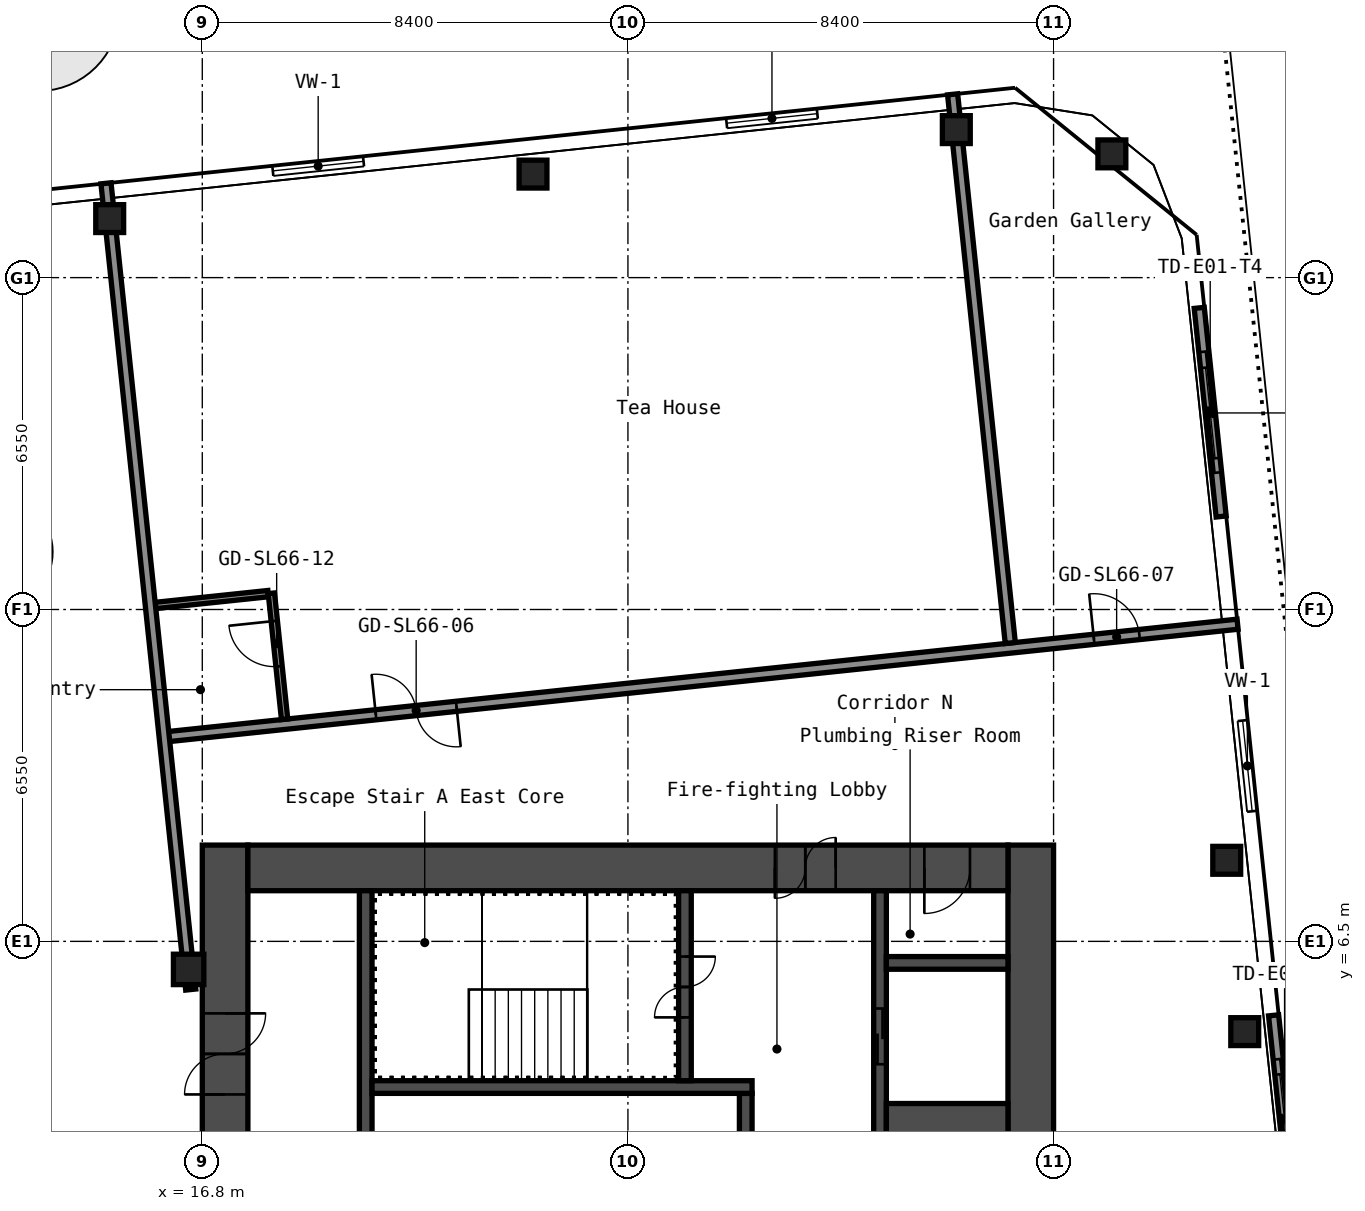
"""IFC4 building model, lengths in metres.
Left out: names, types, materials, properties, quantities, classifications, styles, units other than length and angle.
Written with IfcOpenShell. Run it as: python <this file> out.ifc"""

import sys

from ifc_helpers import new_model, si_unit, direction, frame, frame_2d, origin, origin_2d, place, context, subcontext, project, spatial, rectangle, hollow_rectangle, extrude, element, fill, save


model = new_model("IFC4")
c1 = context("Model", 3, precision=1e-05, world=origin(), true_north=direction((0.0, 1.0)))
c2 = subcontext(c1, "Body", "Model", "MODEL_VIEW")
j1 = project(units=[si_unit("LENGTHUNIT", "METRE"), si_unit("PLANEANGLEUNIT", "RADIAN")], contexts=[c1])
p1 = place(None, origin())
s1 = spatial("IfcSite", under=j1, at=p1, CompositionType="ELEMENT")
p2 = place(p1, origin())
s2 = spatial("IfcBuilding", under=s1, at=p2, CompositionType="ELEMENT")
p3 = place(p2, frame((0.0, 0.0, 232.6)))
s3 = spatial("IfcBuildingStorey", under=s2, at=p3, CompositionType="ELEMENT", Elevation=232.6)
p4 = place(p3, frame((16.53, 5.947, 0.0), z_axis=(0.0, 0.0, 1.0), x_axis=(1.0, 0.0, 0.0)))
e1 = element("IfcColumn", 1, at=p4, inside=s3, PredefinedType="COLUMN", context=c2, shape_type="SweptSolid", body=[
    extrude(hollow_rectangle(XDim=0.6, YDim=0.6, WallThickness=0.025, InnerFilletRadius=0.038, OuterFilletRadius=0.062, at=origin_2d()), origin(), (0.0, 0.0, 1.0), 5.95),
])
for number, where, z_axis, x_axis in (
    (2, (14.973, 20.765, 0.0), (0.0, 0.0, 1.0), (1.0, 0.0, 0.0)),
    (3, (23.327, 21.643, 0.0), (0.0, 0.0, 1.0), (1.0, 0.0, 0.0)),
    (4, (31.681, 22.521, 0.0), (0.0, 0.0, 1.0), (1.0, 0.0, 0.0)),
    (5, (37.373, 4.719, 0.0), (0.0, 0.0, 1.0), (1.0, 0.0, 0.0)),
    (6, (37.017, 8.1, 0.0), (0.0, 0.0, 1.0), (1.0, 0.0, 0.0)),
    (7, (34.751, 22.042, 0.0), (0.0, 0.0, 1.0), (1.0, 0.0, 0.0)),
):
    element("IfcColumn", number, at=place(p3, frame(where, z_axis=z_axis, x_axis=x_axis)), inside=s3, PredefinedType="COLUMN", context=c2, shape_type="SweptSolid", body=[
        extrude(hollow_rectangle(XDim=0.55, YDim=0.55, WallThickness=0.022, InnerFilletRadius=0.033, OuterFilletRadius=0.055, at=origin_2d()), origin(), (0.0, 0.0, 1.0), 5.95),
    ])
p5 = place(p3, frame((17.25, -8.4, 0.0), z_axis=(0.0, 0.0, 1.0), x_axis=(0.0, 1.0, 0.0)))
e8 = element("IfcWall", 8, at=p5, inside=s3, PredefinedType="SHEAR", context=c2, shape_type="SweptSolid", body=[
    extrude(rectangle(XDim=16.8, YDim=0.9, at=frame_2d((8.4, 0.0))), origin(), (0.0, 0.0, 1.0), 5.95),
])
p6 = place(p5, frame((11.879, 0.0, 0.0)))
e9 = element("IfcOpeningElement", 9, at=p6, cuts=e8, PredefinedType="OPENING", context=c2, shape_type="SweptSolid", body=[
    extrude(rectangle(XDim=1.6, YDim=2.1, at=frame_2d((0.8, 1.05))), frame((0.0, 0.46, 0.0), z_axis=(0.0, -1.0, 0.0), x_axis=(1.0, 0.0, 0.0)), (0.0, 0.0, 1.0), 0.92),
])
p7 = place(p3, frame((33.15, -8.4, 0.0), z_axis=(0.0, 0.0, 1.0), x_axis=(0.0, 1.0, 0.0)))
e10 = element("IfcWall", 10, at=p7, inside=s3, PredefinedType="SHEAR", context=c2, shape_type="SweptSolid", body=[
    extrude(rectangle(XDim=16.8, YDim=0.9, at=frame_2d((8.4, 0.0))), origin(), (0.0, 0.0, 1.0), 5.95),
])
p8 = place(p3, frame((17.7, 7.95, 0.0), z_axis=(0.0, 0.0, 1.0), x_axis=(1.0, 0.0, 0.0)))
e11 = element("IfcWall", 11, at=p8, inside=s3, PredefinedType="SHEAR", context=c2, shape_type="SweptSolid", body=[
    extrude(rectangle(XDim=15.0, YDim=0.9, at=frame_2d((7.5, 0.0))), origin(), (0.0, 0.0, 1.0), 5.95),
])
p9 = place(p8, frame((10.4, 0.0, 0.0)))
e12 = element("IfcOpeningElement", 12, at=p9, cuts=e11, PredefinedType="OPENING", context=c2, shape_type="SweptSolid", body=[
    extrude(rectangle(XDim=1.2, YDim=2.1, at=frame_2d((0.6, 1.05))), frame((0.0, 0.46, 0.0), z_axis=(0.0, -1.0, 0.0), x_axis=(1.0, 0.0, 0.0)), (0.0, 0.0, 1.0), 0.92),
])
p10 = place(p8, frame((13.35, 0.0, 0.0)))
e13 = element("IfcOpeningElement", 13, at=p10, cuts=e11, PredefinedType="OPENING", context=c2, shape_type="SweptSolid", body=[
    extrude(rectangle(XDim=0.9, YDim=2.1, at=frame_2d((0.45, 1.05))), frame((0.0, 0.46, 0.0), z_axis=(0.0, -1.0, 0.0), x_axis=(1.0, 0.0, 0.0)), (0.0, 0.0, 1.0), 0.92),
])
p11 = place(p3, frame((20.025, 1.2, 0.0), z_axis=(0.0, 0.0, 1.0), x_axis=(0.0, 1.0, 0.0)))
e14 = element("IfcWall", 14, at=p11, inside=s3, PredefinedType="SHEAR", context=c2, shape_type="SweptSolid", body=[
    extrude(rectangle(XDim=6.3, YDim=0.25, at=frame_2d((3.15, 0.0))), origin(), (0.0, 0.0, 1.0), 5.95),
])
p12 = place(p3, frame((27.525, 1.45, 0.0), z_axis=(0.0, 0.0, 1.0), x_axis=(0.0, 1.0, 0.0)))
e15 = element("IfcWall", 15, at=p12, inside=s3, PredefinedType="SHEAR", context=c2, shape_type="SweptSolid", body=[
    extrude(rectangle(XDim=2.05, YDim=0.25, at=frame_2d((1.025, 0.0))), origin(), (0.0, 0.0, 1.0), 5.95),
])
p13 = place(p3, frame((20.15, 3.625, 0.0), z_axis=(0.0, 0.0, 1.0), x_axis=(1.0, 0.0, 0.0)))
e16 = element("IfcWall", 16, at=p13, inside=s3, PredefinedType="SHEAR", context=c2, shape_type="SweptSolid", body=[
    extrude(rectangle(XDim=7.5, YDim=0.25, at=frame_2d((3.75, 0.0))), origin(), (0.0, 0.0, 1.0), 5.95),
])
p14 = place(p3, frame((26.325, 3.75, 0.0), z_axis=(0.0, 0.0, 1.0), x_axis=(0.0, 1.0, 0.0)))
e17 = element("IfcWall", 17, at=p14, inside=s3, PredefinedType="SHEAR", context=c2, shape_type="SweptSolid", body=[
    extrude(rectangle(XDim=3.75, YDim=0.25, at=frame_2d((1.875, 0.0))), origin(), (0.0, 0.0, 1.0), 5.95),
])
p15 = place(p14, frame((1.25, 0.0, 0.0)))
e18 = element("IfcOpeningElement", 18, at=p15, cuts=e17, PredefinedType="OPENING", context=c2, shape_type="SweptSolid", body=[
    extrude(rectangle(XDim=1.2, YDim=2.1, at=frame_2d((0.6, 1.05))), frame((0.0, 0.135, 0.0), z_axis=(0.0, -1.0, 0.0), x_axis=(1.0, 0.0, 0.0)), (0.0, 0.0, 1.0), 0.27),
])
p16 = place(p3, frame((30.175, 1.45, 0.0), z_axis=(0.0, 0.0, 1.0), x_axis=(0.0, 1.0, 0.0)))
e19 = element("IfcWall", 19, at=p16, inside=s3, PredefinedType="SHEAR", context=c2, shape_type="SweptSolid", body=[
    extrude(rectangle(XDim=6.05, YDim=0.25, at=frame_2d((3.025, 0.0))), origin(), (0.0, 0.0, 1.0), 5.95),
])
p17 = place(p16, frame((2.625, 0.0, 0.0)))
e20 = element("IfcOpeningElement", 20, at=p17, cuts=e19, PredefinedType="OPENING", context=c2, shape_type="SweptSolid", body=[
    extrude(rectangle(XDim=1.1, YDim=2.1, at=frame_2d((0.55, 1.05))), frame((0.0, 0.135, 0.0), z_axis=(0.0, -1.0, 0.0), x_axis=(1.0, 0.0, 0.0)), (0.0, 0.0, 1.0), 0.27),
])
p18 = place(p3, frame((30.3, 2.375, 0.0), z_axis=(0.0, 0.0, 1.0), x_axis=(1.0, 0.0, 0.0)))
e21 = element("IfcWall", 21, at=p18, inside=s3, PredefinedType="SHEAR", context=c2, shape_type="SweptSolid", body=[
    extrude(rectangle(XDim=2.4, YDim=1.85, at=frame_2d((1.2, 0.0))), origin(), (0.0, 0.0, 1.0), 5.95),
])
p19 = place(p3, frame((30.3, 6.075, 0.0), z_axis=(0.0, 0.0, 1.0), x_axis=(1.0, 0.0, 0.0)))
e22 = element("IfcWall", 22, at=p19, inside=s3, PredefinedType="SHEAR", context=c2, shape_type="SweptSolid", body=[
    extrude(rectangle(XDim=2.4, YDim=0.25, at=frame_2d((1.2, 0.0))), origin(), (0.0, 0.0, 1.0), 5.95),
])
p20 = place(p3, frame((16.048, 10.533, 0.0), z_axis=(0.0, 0.0, 1.0), x_axis=(0.994522460242, 0.104523088709, 0.0)))
e23 = element("IfcWall", 23, at=p20, inside=s3, PredefinedType="PARTITIONING", context=c2, shape_type="SweptSolid", body=[
    extrude(rectangle(XDim=21.3, YDim=0.2, at=frame_2d((10.65, 0.0))), origin(), (0.0, 0.0, 1.0), 5.95),
])
p21 = place(p20, frame((4.2, 0.0, 0.0)))
e24 = element("IfcOpeningElement", 24, at=p21, cuts=e23, PredefinedType="OPENING", context=c2, shape_type="SweptSolid", body=[
    extrude(rectangle(XDim=1.6, YDim=2.1, at=frame_2d((0.8, 1.05))), frame((0.0, 0.11, 0.0), z_axis=(0.0, -1.0, 0.0), x_axis=(1.0, 0.0, 0.0)), (0.0, 0.0, 1.0), 0.22),
])
p22 = place(p20, frame((18.45, 0.0, 0.0)))
e25 = element("IfcOpeningElement", 25, at=p22, cuts=e23, PredefinedType="OPENING", context=c2, shape_type="SweptSolid", body=[
    extrude(rectangle(XDim=0.9, YDim=2.1, at=frame_2d((0.45, 1.05))), frame((0.0, 0.11, 0.0), z_axis=(0.0, -1.0, 0.0), x_axis=(1.0, 0.0, 0.0)), (0.0, 0.0, 1.0), 0.22),
])
p23 = place(p3, frame((15.876, 13.129, 0.0), z_axis=(0.0, 0.0, 1.0), x_axis=(0.994520987839, 0.104537097471, 0.0)))
e26 = element("IfcWall", 26, at=p23, inside=s3, PredefinedType="PARTITIONING", context=c2, shape_type="SweptSolid", body=[
    extrude(rectangle(XDim=2.237, YDim=0.125, at=frame_2d((1.119, 0.0))), origin(), (0.0, 0.0, 1.0), 5.95),
])
p24 = place(p3, frame((16.572, 5.549, 0.0), z_axis=(0.0, 0.0, 1.0), x_axis=(-0.104522747265, 0.994522496128, 0.0)))
e27 = element("IfcWall", 27, at=p24, inside=s3, PredefinedType="PARTITIONING", context=c2, shape_type="SweptSolid", body=[
    extrude(rectangle(XDim=16.0, YDim=0.2, at=frame_2d((8.0, 0.0))), origin(), (0.0, 0.0, 1.0), 5.95),
])
p25 = place(p3, frame((18.425, 10.884, 0.0), z_axis=(0.0, 0.0, 1.0), x_axis=(-0.104501760842, 0.994524701544, 0.0)))
e28 = element("IfcWall", 28, at=p25, inside=s3, PredefinedType="PARTITIONING", context=c2, shape_type="SweptSolid", body=[
    extrude(rectangle(XDim=2.5, YDim=0.125, at=frame_2d((1.25, 0.0))), origin(), (0.0, 0.0, 1.0), 5.95),
])
p26 = place(p25, frame((1.05, 0.0, 0.0)))
e29 = element("IfcOpeningElement", 29, at=p26, cuts=e28, PredefinedType="OPENING", context=c2, shape_type="SweptSolid", body=[
    extrude(rectangle(XDim=0.9, YDim=2.1, at=frame_2d((0.45, 1.05))), frame((0.0, 0.073, 0.0), z_axis=(0.0, -1.0, 0.0), x_axis=(1.0, 0.0, 0.0)), (0.0, 0.0, 1.0), 0.145),
])
p27 = place(p3, frame((32.746, 12.389, 0.0), z_axis=(0.0, 0.0, 1.0), x_axis=(-0.104533048416, 0.994521413439, 0.0)))
e30 = element("IfcWall", 30, at=p27, inside=s3, PredefinedType="PARTITIONING", context=c2, shape_type="SweptSolid", body=[
    extrude(rectangle(XDim=10.888, YDim=0.2, at=frame_2d((5.444, 0.0))), origin(), (0.0, 0.0, 1.0), 5.95),
])
p28 = place(p3, frame((38.526, -0.509, 4.45), z_axis=(0.0, 0.0, 1.0), x_axis=(-0.104543574031, 0.994520307047, 0.0)))
p29 = place(p28, frame((2.61, 0.0, 0.25)))
p30 = place(p29, origin())
e31 = element("IfcWindow", 31, at=p30, inside=s3, PartitioningType="SINGLE_PANEL", PredefinedType="WINDOW", context=c2, shape_type="SweptSolid", body=[
    extrude(rectangle(XDim=1.8, YDim=0.9, at=frame_2d((0.9, 0.45))), frame((0.0, 0.03, 0.0), z_axis=(0.0, -1.0, 0.0), x_axis=(1.0, 0.0, 0.0)), (0.0, 0.0, 1.0), 0.06),
])
p31 = place(p3, frame((37.792, 6.472, 4.45), z_axis=(0.0, 0.0, 1.0), x_axis=(-0.104512790532, 0.994523542514, 0.0)))
p32 = place(p31, frame((2.61, 0.0, 0.25)))
p33 = place(p32, origin())
e32 = element("IfcWindow", 32, at=p33, inside=s3, PartitioningType="SINGLE_PANEL", PredefinedType="WINDOW", context=c2, shape_type="SweptSolid", body=[
    extrude(rectangle(XDim=1.8, YDim=0.9, at=frame_2d((0.9, 0.45))), frame((0.0, 0.03, 0.0), z_axis=(0.0, -1.0, 0.0), x_axis=(1.0, 0.0, 0.0)), (0.0, 0.0, 1.0), 0.06),
])
p34 = place(p3, frame((37.058, 13.453, 4.45), z_axis=(0.0, 0.0, 1.0), x_axis=(-0.104541145751, 0.994520562304, 0.0)))
p35 = place(p34, frame((2.595, 0.0, 0.25)))
p36 = place(p35, origin())
e33 = element("IfcWindow", 33, at=p36, inside=s3, PartitioningType="SINGLE_PANEL", PredefinedType="WINDOW", context=c2, shape_type="SweptSolid", body=[
    extrude(rectangle(XDim=1.8, YDim=0.9, at=frame_2d((0.9, 0.45))), frame((0.0, 0.03, 0.0), z_axis=(0.0, -1.0, 0.0), x_axis=(1.0, 0.0, 0.0)), (0.0, 0.0, 1.0), 0.06),
])
p37 = place(p3, frame((38.375, 0.923, 0.0), z_axis=(0.0, 0.0, 1.0), x_axis=(-0.10450059231, 0.994524824329, 0.0)))
p38 = place(p37, frame((0.87, 0.0, 0.0)))
p39 = place(p38, frame((2.4, 0.0, 0.0), z_axis=(0.0, 0.0, 1.0), x_axis=(-1.0, 0.0, 0.0)))
e34 = element("IfcDoor", 34, at=p39, inside=s3, OperationType="SLIDING_TO_LEFT", PredefinedType="DOOR", context=c2, shape_type="SweptSolid", body=[
    extrude(rectangle(XDim=2.4, YDim=2.2, at=frame_2d((1.2, 1.1))), frame((0.0, 0.025, 0.0), z_axis=(0.0, -1.0, 0.0), x_axis=(1.0, 0.0, 0.0)), (0.0, 0.0, 1.0), 0.05),
])
p40 = place(p3, frame((36.907, 14.885, 0.0), z_axis=(0.0, 0.0, 1.0), x_axis=(-0.10449446367, 0.994525468282, 0.0)))
p41 = place(p40, frame((0.87, 0.0, 0.0)))
p42 = place(p41, frame((2.4, 0.0, 0.0), z_axis=(0.0, 0.0, 1.0), x_axis=(-1.0, 0.0, 0.0)))
e35 = element("IfcDoor", 35, at=p42, inside=s3, OperationType="SLIDING_TO_LEFT", PredefinedType="DOOR", context=c2, shape_type="SweptSolid", body=[
    extrude(rectangle(XDim=2.4, YDim=2.2, at=frame_2d((1.2, 1.1))), frame((0.0, 0.025, 0.0), z_axis=(0.0, -1.0, 0.0), x_axis=(1.0, 0.0, 0.0)), (0.0, 0.0, 1.0), 0.05),
])
p43 = place(p3, frame((32.821, 23.244, 4.45), z_axis=(0.0, 0.0, 1.0), x_axis=(-0.994522424081, -0.104523432778, 0.0)))
p44 = place(p43, frame((3.905, 0.0, 0.25)))
p45 = place(p44, origin())
e36 = element("IfcWindow", 36, at=p45, inside=s3, PartitioningType="SINGLE_PANEL", PredefinedType="WINDOW", context=c2, shape_type="SweptSolid", body=[
    extrude(rectangle(XDim=1.8, YDim=0.9, at=frame_2d((0.9, 0.45))), frame((0.0, 0.03, 0.0), z_axis=(0.0, -1.0, 0.0), x_axis=(1.0, 0.0, 0.0)), (0.0, 0.0, 1.0), 0.06),
])
p46 = place(p3, frame((23.264, 22.24, 4.45), z_axis=(0.0, 0.0, 1.0), x_axis=(-0.994520253788, -0.104544080685, 0.0)))
p47 = place(p46, frame((3.3, 0.0, 0.25)))
p48 = place(p47, origin())
e37 = element("IfcWindow", 37, at=p48, inside=s3, PartitioningType="SINGLE_PANEL", PredefinedType="WINDOW", context=c2, shape_type="SweptSolid", body=[
    extrude(rectangle(XDim=1.8, YDim=0.9, at=frame_2d((0.9, 0.45))), frame((0.0, 0.03, 0.0), z_axis=(0.0, -1.0, 0.0), x_axis=(1.0, 0.0, 0.0)), (0.0, 0.0, 1.0), 0.06),
])
p49 = place(p6, origin())
e38 = element("IfcDoor", 38, at=p49, inside=s3, OperationType="DOUBLE_DOOR_SINGLE_SWING", PredefinedType="DOOR", context=c2, shape_type="SweptSolid", body=[
    extrude(rectangle(XDim=1.6, YDim=2.1, at=frame_2d((0.8, 1.05))), frame((0.0, 0.025, 0.0), z_axis=(0.0, -1.0, 0.0), x_axis=(1.0, 0.0, 0.0)), (0.0, 0.0, 1.0), 0.05),
])
fill(e9, e38)
p50 = place(p9, origin())
e39 = element("IfcDoor", 39, at=p50, inside=s3, OperationType="DOUBLE_DOOR_SINGLE_SWING", PredefinedType="DOOR", context=c2, shape_type="SweptSolid", body=[
    extrude(rectangle(XDim=1.2, YDim=2.1, at=frame_2d((0.6, 1.05))), frame((0.0, 0.025, 0.0), z_axis=(0.0, -1.0, 0.0), x_axis=(1.0, 0.0, 0.0)), (0.0, 0.0, 1.0), 0.05),
])
fill(e12, e39)
p51 = place(p10, origin())
e40 = element("IfcDoor", 40, at=p51, inside=s3, OperationType="SINGLE_SWING_LEFT", PredefinedType="DOOR", context=c2, shape_type="SweptSolid", body=[
    extrude(rectangle(XDim=0.9, YDim=2.1, at=frame_2d((0.45, 1.05))), frame((0.0, 0.025, 0.0), z_axis=(0.0, -1.0, 0.0), x_axis=(1.0, 0.0, 0.0)), (0.0, 0.0, 1.0), 0.05),
])
fill(e13, e40)
p52 = place(p15, origin())
e41 = element("IfcDoor", 41, at=p52, inside=s3, OperationType="DOUBLE_DOOR_SINGLE_SWING", PredefinedType="DOOR", context=c2, shape_type="SweptSolid", body=[
    extrude(rectangle(XDim=1.2, YDim=2.1, at=frame_2d((0.6, 1.05))), frame((0.0, 0.025, 0.0), z_axis=(0.0, -1.0, 0.0), x_axis=(1.0, 0.0, 0.0)), (0.0, 0.0, 1.0), 0.05),
])
fill(e18, e41)
p53 = place(p17, origin())
e42 = element("IfcDoor", 42, at=p53, inside=s3, OperationType="DOUBLE_DOOR_SLIDING", PredefinedType="DOOR", context=c2, shape_type="SweptSolid", body=[
    extrude(rectangle(XDim=1.1, YDim=2.1, at=frame_2d((0.55, 1.05))), frame((0.0, 0.025, 0.0), z_axis=(0.0, -1.0, 0.0), x_axis=(1.0, 0.0, 0.0)), (0.0, 0.0, 1.0), 0.05),
])
fill(e20, e42)
p54 = place(p21, origin())
e43 = element("IfcDoor", 43, at=p54, inside=s3, OperationType="DOUBLE_DOOR_SINGLE_SWING", PredefinedType="DOOR", context=c2, shape_type="SweptSolid", body=[
    extrude(rectangle(XDim=1.6, YDim=2.1, at=frame_2d((0.8, 1.05))), frame((0.0, 0.025, 0.0), z_axis=(0.0, -1.0, 0.0), x_axis=(1.0, 0.0, 0.0)), (0.0, 0.0, 1.0), 0.05),
])
fill(e24, e43)
p55 = place(p22, origin())
e44 = element("IfcDoor", 44, at=p55, inside=s3, OperationType="SINGLE_SWING_RIGHT", PredefinedType="DOOR", context=c2, shape_type="SweptSolid", body=[
    extrude(rectangle(XDim=0.9, YDim=2.1, at=frame_2d((0.45, 1.05))), frame((0.0, 0.025, 0.0), z_axis=(0.0, -1.0, 0.0), x_axis=(1.0, 0.0, 0.0)), (0.0, 0.0, 1.0), 0.05),
])
fill(e25, e44)
p56 = place(p26, origin())
e45 = element("IfcDoor", 45, at=p56, inside=s3, OperationType="SINGLE_SWING_LEFT", PredefinedType="DOOR", context=c2, shape_type="SweptSolid", body=[
    extrude(rectangle(XDim=0.9, YDim=2.1, at=frame_2d((0.45, 1.05))), frame((0.0, 0.025, 0.0), z_axis=(0.0, -1.0, 0.0), x_axis=(1.0, 0.0, 0.0)), (0.0, 0.0, 1.0), 0.05),
])
fill(e29, e45)
save(model, sys.argv[1])
